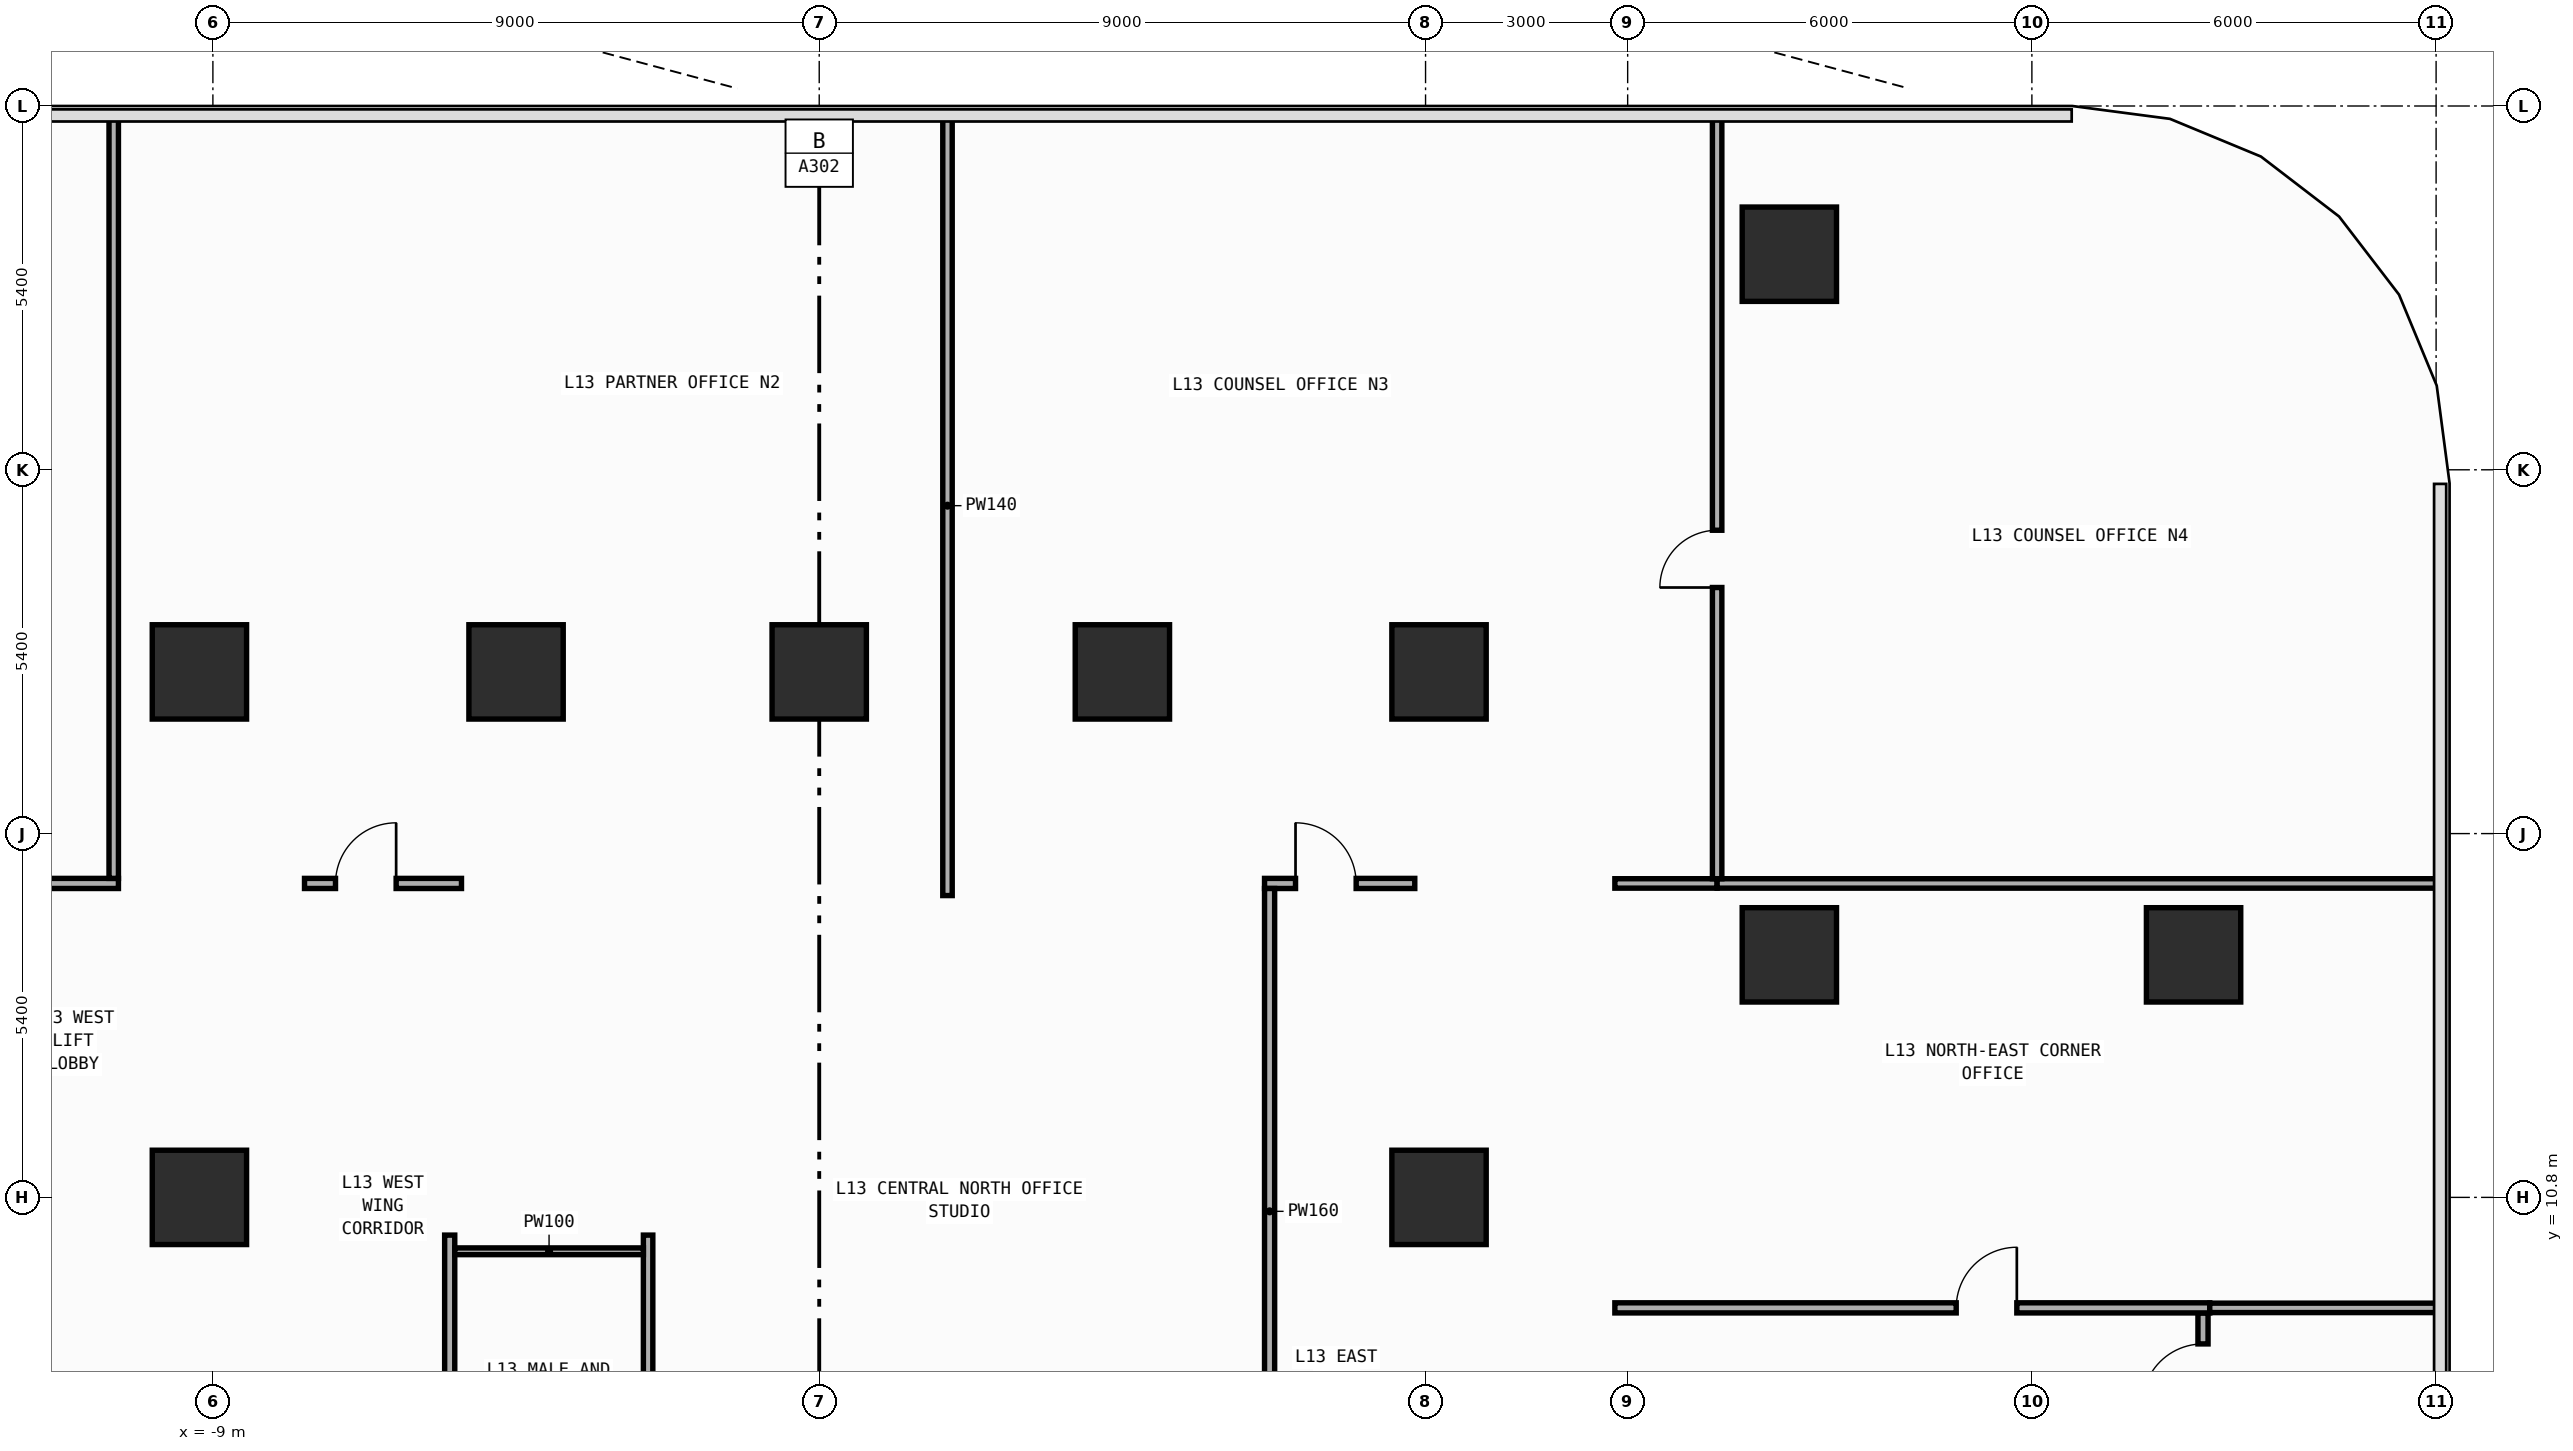
"""IFC4 building model, lengths in metres.
Left out: names, types, materials, properties, quantities, classifications, styles, units other than length and angle.
Written with IfcOpenShell. Run it as: python <this file> out.ifc"""

import sys

from ifc_helpers import new_model, si_unit, direction, frame, frame_2d, origin, origin_2d, place, context, subcontext, project, spatial, rectangle, extrude, element, fill, save


model = new_model("IFC4")
c1 = context("Model", 3, precision=1e-05, world=origin(), true_north=direction((0.0, 1.0)))
c2 = subcontext(c1, "Body", "Model", "MODEL_VIEW")
j1 = project(units=[si_unit("LENGTHUNIT", "METRE"), si_unit("PLANEANGLEUNIT", "RADIAN")], contexts=[c1])
p1 = place(None, origin())
s1 = spatial("IfcSite", under=j1, at=p1, CompositionType="ELEMENT")
p2 = place(p1, origin())
s2 = spatial("IfcBuilding", under=s1, at=p2, CompositionType="ELEMENT")
p3 = place(p2, frame((0.0, 0.0, 55.4)))
s3 = spatial("IfcBuildingStorey", under=s2, at=p3, CompositionType="ELEMENT", Elevation=55.4)
for number, where, z_axis, x_axis in (
    (1, (-9.2, 10.8, 0.0), (0.0, 0.0, 1.0), (1.0, 0.0, 0.0)),
    (2, (-9.2, 18.6, 0.0), (0.0, 0.0, 1.0), (1.0, 0.0, 0.0)),
    (3, (9.2, 10.8, 0.0), (0.0, 0.0, 1.0), (1.0, 0.0, 0.0)),
    (4, (9.2, 18.6, 0.0), (0.0, 0.0, 1.0), (1.0, 0.0, 0.0)),
    (5, (20.4, 14.4, 0.0), (0.0, 0.0, 1.0), (1.0, 0.0, 0.0)),
    (6, (14.4, 14.4, 0.0), (0.0, 0.0, 1.0), (1.0, 0.0, 0.0)),
    (7, (-4.5, 18.6, 0.0), (0.0, 0.0, 1.0), (1.0, 0.0, 0.0)),
    (8, (0.0, 18.6, 0.0), (0.0, 0.0, 1.0), (1.0, 0.0, 0.0)),
    (9, (4.5, 18.6, 0.0), (0.0, 0.0, 1.0), (1.0, 0.0, 0.0)),
    (10, (14.4, 24.8, 0.0), (0.0, 0.0, 1.0), (1.0, 0.0, 0.0)),
):
    element("IfcColumn", number, at=place(p3, frame(where, z_axis=z_axis, x_axis=x_axis)), inside=s3, PredefinedType="COLUMN", context=c2, shape_type="SweptSolid", body=[
        extrude(rectangle(XDim=1.4, YDim=1.4, at=origin_2d()), origin(), (0.0, 0.0, 1.0), 4.2),
    ])
p4 = place(p3, frame((-11.99, 15.46, 0.0), z_axis=(0.0, 0.0, 1.0), x_axis=(1.0, 0.0, 0.0)))
e11 = element("IfcWall", 11, at=p4, inside=s3, PredefinedType="PARTITIONING", context=c2, shape_type="SweptSolid", body=[
    extrude(rectangle(XDim=1.588, YDim=0.15, at=frame_2d((0.794, 0.0))), origin(), (0.0, 0.0, 1.0), 3.94),
])
p5 = place(p3, frame((-7.64, 15.46, 0.0), z_axis=(0.0, 0.0, 1.0), x_axis=(1.0, 0.0, 0.0)))
e12 = element("IfcWall", 12, at=p5, inside=s3, PredefinedType="PARTITIONING", context=c2, shape_type="SweptSolid", body=[
    extrude(rectangle(XDim=2.33, YDim=0.15, at=frame_2d((1.165, 0.0))), origin(), (0.0, 0.0, 1.0), 3.94),
])
p6 = place(p5, frame((0.46, 0.0, 0.0)))
e13 = element("IfcOpeningElement", 13, at=p6, cuts=e12, PredefinedType="OPENING", context=c2, shape_type="SweptSolid", body=[
    extrude(rectangle(XDim=0.9, YDim=2.15, at=frame_2d((0.45, 1.075))), frame((0.0, 0.085, 0.0), z_axis=(0.0, -1.0, 0.0), x_axis=(1.0, 0.0, 0.0)), (0.0, 0.0, 1.0), 0.17),
])
p7 = place(p3, frame((-5.485, 3.28, 0.0), z_axis=(0.0, 0.0, 1.0), x_axis=(0.0, 1.0, 0.0)))
e14 = element("IfcWall", 14, at=p7, inside=s3, PredefinedType="PARTITIONING", context=c2, shape_type="SweptSolid", body=[
    extrude(rectangle(XDim=6.96, YDim=0.15, at=frame_2d((3.48, 0.0))), origin(), (0.0, 0.0, 1.0), 3.94),
])
p8 = place(p7, frame((1.694, 0.0, 0.0)))
e15 = element("IfcOpeningElement", 15, at=p8, cuts=e14, PredefinedType="OPENING", context=c2, shape_type="SweptSolid", body=[
    extrude(rectangle(XDim=0.9, YDim=2.15, at=frame_2d((0.45, 1.075))), frame((0.0, 0.085, 0.0), z_axis=(0.0, -1.0, 0.0), x_axis=(1.0, 0.0, 0.0)), (0.0, 0.0, 1.0), 0.17),
])
p9 = place(p3, frame((6.61, 15.46, 0.0), z_axis=(0.0, 0.0, 1.0), x_axis=(1.0, 0.0, 0.0)))
e16 = element("IfcWall", 16, at=p9, inside=s3, PredefinedType="PARTITIONING", context=c2, shape_type="SweptSolid", body=[
    extrude(rectangle(XDim=2.23, YDim=0.15, at=frame_2d((1.115, 0.0))), origin(), (0.0, 0.0, 1.0), 3.94),
])
p10 = place(p9, frame((0.46, 0.0, 0.0)))
e17 = element("IfcOpeningElement", 17, at=p10, cuts=e16, PredefinedType="OPENING", context=c2, shape_type="SweptSolid", body=[
    extrude(rectangle(XDim=0.9, YDim=2.15, at=frame_2d((0.45, 1.075))), frame((0.0, 0.085, 0.0), z_axis=(0.0, -1.0, 0.0), x_axis=(1.0, 0.0, 0.0)), (0.0, 0.0, 1.0), 0.17),
])
p11 = place(p3, frame((6.685, -0.02, 0.0), z_axis=(0.0, 0.0, 1.0), x_axis=(0.0, 1.0, 0.0)))
e18 = element("IfcWall", 18, at=p11, inside=s3, PredefinedType="PARTITIONING", context=c2, shape_type="SweptSolid", body=[
    extrude(rectangle(XDim=15.405, YDim=0.15, at=frame_2d((7.703, 0.0))), origin(), (0.0, 0.0, 1.0), 3.94),
])
p12 = place(p11, frame((4.921, 0.0, 0.0)))
e19 = element("IfcOpeningElement", 19, at=p12, cuts=e18, PredefinedType="OPENING", context=c2, shape_type="SweptSolid", body=[
    extrude(rectangle(XDim=0.9, YDim=2.15, at=frame_2d((0.45, 1.075))), frame((0.0, 0.085, 0.0), z_axis=(0.0, -1.0, 0.0), x_axis=(1.0, 0.0, 0.0)), (0.0, 0.0, 1.0), 0.17),
])
p13 = place(p3, frame((20.54, 7.06, 0.0), z_axis=(0.0, 0.0, 1.0), x_axis=(0.0, 1.0, 0.0)))
e20 = element("IfcWall", 20, at=p13, inside=s3, PredefinedType="PARTITIONING", context=c2, shape_type="SweptSolid", body=[
    extrude(rectangle(XDim=2.025, YDim=0.15, at=frame_2d((1.012, 0.0))), origin(), (0.0, 0.0, 1.0), 3.94),
])
p14 = place(p13, frame((0.665, 0.0, 0.0)))
e21 = element("IfcOpeningElement", 21, at=p14, cuts=e20, PredefinedType="OPENING", context=c2, shape_type="SweptSolid", body=[
    extrude(rectangle(XDim=0.9, YDim=2.15, at=frame_2d((0.45, 1.075))), frame((0.0, 0.085, 0.0), z_axis=(0.0, -1.0, 0.0), x_axis=(1.0, 0.0, 0.0)), (0.0, 0.0, 1.0), 0.17),
])
p15 = place(p3, frame((11.81, 9.16, 0.0), z_axis=(0.0, 0.0, 1.0), x_axis=(1.0, 0.0, 0.0)))
e22 = element("IfcWall", 22, at=p15, inside=s3, PredefinedType="PARTITIONING", context=c2, shape_type="SweptSolid", body=[
    extrude(rectangle(XDim=8.83, YDim=0.15, at=frame_2d((4.415, 0.0))), origin(), (0.0, 0.0, 1.0), 3.94),
])
p16 = place(p15, frame((5.067, 0.0, 0.0)))
e23 = element("IfcOpeningElement", 23, at=p16, cuts=e22, PredefinedType="OPENING", context=c2, shape_type="SweptSolid", body=[
    extrude(rectangle(XDim=0.9, YDim=2.15, at=frame_2d((0.45, 1.075))), frame((0.0, 0.085, 0.0), z_axis=(0.0, -1.0, 0.0), x_axis=(1.0, 0.0, 0.0)), (0.0, 0.0, 1.0), 0.17),
])
p17 = place(p3, frame((20.64, 9.16, 0.0), z_axis=(0.0, 0.0, 1.0), x_axis=(1.0, 0.0, 0.0)))
e24 = element("IfcWall", 24, at=p17, inside=s3, PredefinedType="PARTITIONING", context=c2, shape_type="SweptSolid", body=[
    extrude(rectangle(XDim=3.415, YDim=0.14, at=frame_2d((1.708, 0.0))), origin(), (0.0, 0.0, 1.0), 3.94),
])
p18 = place(p3, frame((11.81, 15.46, 0.0), z_axis=(0.0, 0.0, 1.0), x_axis=(1.0, 0.0, 0.0)))
e25 = element("IfcWall", 25, at=p18, inside=s3, PredefinedType="PARTITIONING", context=c2, shape_type="SweptSolid", body=[
    extrude(rectangle(XDim=1.518, YDim=0.14, at=frame_2d((0.759, 0.0))), origin(), (0.0, 0.0, 1.0), 3.94),
])
p19 = place(p3, frame((13.328, 15.46, 0.0), z_axis=(0.0, 0.0, 1.0), x_axis=(1.0, 0.0, 0.0)))
e26 = element("IfcWall", 26, at=p19, inside=s3, PredefinedType="PARTITIONING", context=c2, shape_type="SweptSolid", body=[
    extrude(rectangle(XDim=10.727, YDim=0.14, at=frame_2d((5.364, 0.0))), origin(), (0.0, 0.0, 1.0), 3.94),
])
p20 = place(p3, frame((-10.472, 15.535, 0.0), z_axis=(0.0, 0.0, 1.0), x_axis=(0.0, 1.0, 0.0)))
e27 = element("IfcWall", 27, at=p20, inside=s3, PredefinedType="PARTITIONING", context=c2, shape_type="SweptSolid", body=[
    extrude(rectangle(XDim=11.32, YDim=0.14, at=frame_2d((5.66, 0.0))), origin(), (0.0, 0.0, 1.0), 3.94),
])
p21 = place(p3, frame((1.904, 15.28, 0.0), z_axis=(0.0, 0.0, 1.0), x_axis=(0.0, 1.0, 0.0)))
e28 = element("IfcWall", 28, at=p21, inside=s3, PredefinedType="PARTITIONING", context=c2, shape_type="SweptSolid", body=[
    extrude(rectangle(XDim=11.575, YDim=0.14, at=frame_2d((5.788, 0.0))), origin(), (0.0, 0.0, 1.0), 3.94),
])
p22 = place(p3, frame((13.328, 15.53, 0.0), z_axis=(0.0, 0.0, 1.0), x_axis=(0.0, 1.0, 0.0)))
e29 = element("IfcWall", 29, at=p22, inside=s3, PredefinedType="PARTITIONING", context=c2, shape_type="SweptSolid", body=[
    extrude(rectangle(XDim=11.325, YDim=0.14, at=frame_2d((5.663, 0.0))), origin(), (0.0, 0.0, 1.0), 3.94),
])
p23 = place(p22, frame((4.323, 0.0, 0.0)))
e30 = element("IfcOpeningElement", 30, at=p23, cuts=e29, PredefinedType="OPENING", context=c2, shape_type="SweptSolid", body=[
    extrude(rectangle(XDim=0.85, YDim=2.1, at=frame_2d((0.425, 1.05))), frame((0.0, 0.08, 0.0), z_axis=(0.0, -1.0, 0.0), x_axis=(1.0, 0.0, 0.0)), (0.0, 0.0, 1.0), 0.16),
])
p24 = place(p3, frame((-2.54, 3.28, 0.0), z_axis=(0.0, 0.0, 1.0), x_axis=(0.0, 1.0, 0.0)))
e31 = element("IfcWall", 31, at=p24, inside=s3, PredefinedType="PARTITIONING", context=c2, shape_type="SweptSolid", body=[
    extrude(rectangle(XDim=6.96, YDim=0.14, at=frame_2d((3.48, 0.0))), origin(), (0.0, 0.0, 1.0), 3.94),
])
p25 = place(p3, frame((-5.41, 10.0, 0.0), z_axis=(0.0, 0.0, 1.0), x_axis=(1.0, 0.0, 0.0)))
e32 = element("IfcWall", 32, at=p25, inside=s3, PredefinedType="PARTITIONING", context=c2, shape_type="SweptSolid", body=[
    extrude(rectangle(XDim=2.8, YDim=0.1, at=frame_2d((1.4, 0.0))), origin(), (0.0, 0.0, 1.0), 3.94),
])
p26 = place(p6, origin())
e33 = element("IfcDoor", 33, at=p26, inside=s3, OperationType="SINGLE_SWING_RIGHT", PredefinedType="DOOR", context=c2, shape_type="SweptSolid", body=[
    extrude(rectangle(XDim=0.9, YDim=2.15, at=frame_2d((0.45, 1.075))), frame((0.0, 0.025, 0.0), z_axis=(0.0, -1.0, 0.0), x_axis=(1.0, 0.0, 0.0)), (0.0, 0.0, 1.0), 0.05),
])
fill(e13, e33)
p27 = place(p10, origin())
e34 = element("IfcDoor", 34, at=p27, inside=s3, OperationType="SINGLE_SWING_LEFT", PredefinedType="DOOR", context=c2, shape_type="SweptSolid", body=[
    extrude(rectangle(XDim=0.9, YDim=2.15, at=frame_2d((0.45, 1.075))), frame((0.0, 0.025, 0.0), z_axis=(0.0, -1.0, 0.0), x_axis=(1.0, 0.0, 0.0)), (0.0, 0.0, 1.0), 0.05),
])
fill(e17, e34)
p28 = place(p14, origin())
e35 = element("IfcDoor", 35, at=p28, inside=s3, OperationType="SINGLE_SWING_LEFT", PredefinedType="DOOR", context=c2, shape_type="SweptSolid", body=[
    extrude(rectangle(XDim=0.9, YDim=2.15, at=frame_2d((0.45, 1.075))), frame((0.0, 0.025, 0.0), z_axis=(0.0, -1.0, 0.0), x_axis=(1.0, 0.0, 0.0)), (0.0, 0.0, 1.0), 0.05),
])
fill(e21, e35)
p29 = place(p16, origin())
e36 = element("IfcDoor", 36, at=p29, inside=s3, OperationType="SINGLE_SWING_RIGHT", PredefinedType="DOOR", context=c2, shape_type="SweptSolid", body=[
    extrude(rectangle(XDim=0.9, YDim=2.15, at=frame_2d((0.45, 1.075))), frame((0.0, 0.025, 0.0), z_axis=(0.0, -1.0, 0.0), x_axis=(1.0, 0.0, 0.0)), (0.0, 0.0, 1.0), 0.05),
])
fill(e23, e36)
p30 = place(p23, origin())
e37 = element("IfcDoor", 37, at=p30, inside=s3, OperationType="SINGLE_SWING_LEFT", PredefinedType="DOOR", context=c2, shape_type="SweptSolid", body=[
    extrude(rectangle(XDim=0.85, YDim=2.1, at=frame_2d((0.425, 1.05))), frame((0.0, 0.025, 0.0), z_axis=(0.0, -1.0, 0.0), x_axis=(1.0, 0.0, 0.0)), (0.0, 0.0, 1.0), 0.05),
])
fill(e30, e37)
save(model, sys.argv[1])
